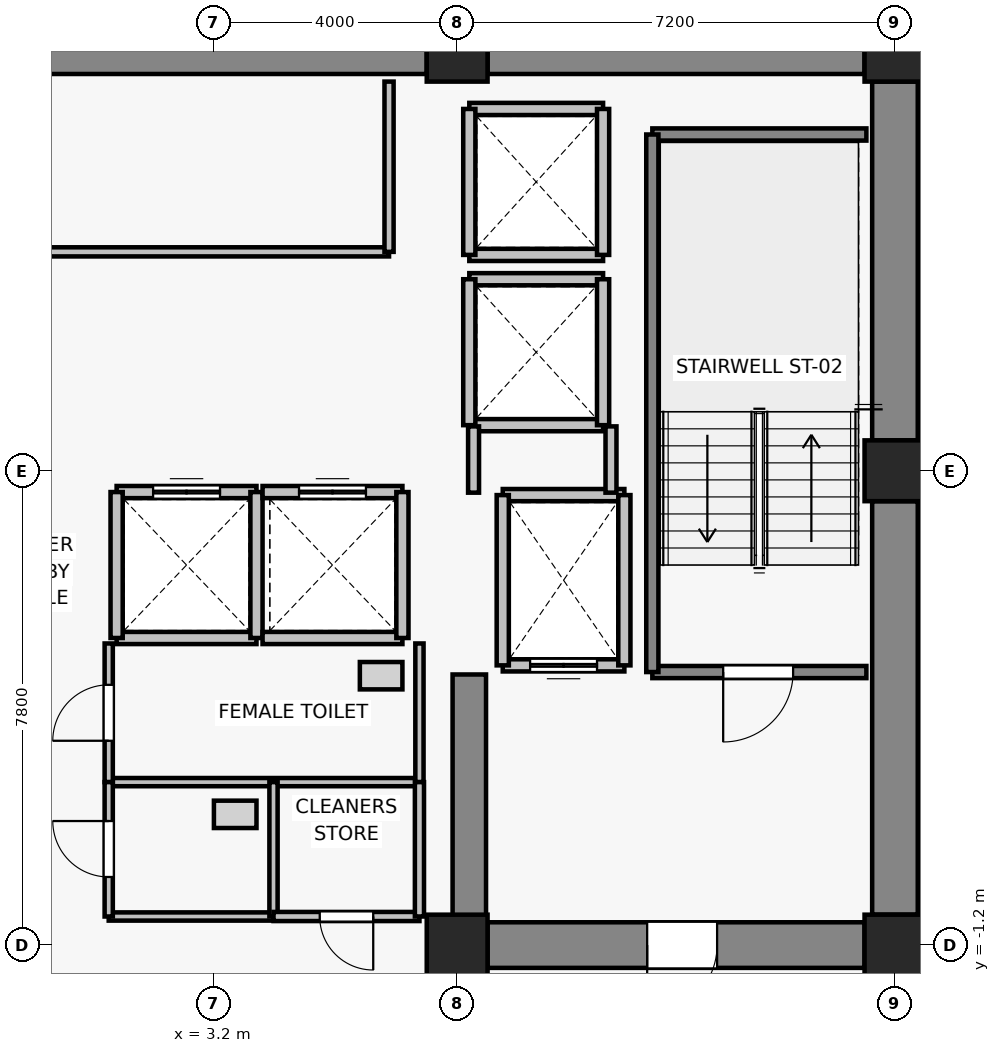
"""IFC4 building model, lengths in metres.
Left out: names, types, materials, properties, quantities, classifications, styles, units other than length and angle.
Written with IfcOpenShell. Run it as: python <this file> out.ifc"""

import sys

from ifc_helpers import new_model, si_unit, direction, frame, frame_2d, origin, origin_2d, place, context, subcontext, project, spatial, rectangle, extrude, source, transform, mapped, element, fill, save


model = new_model("IFC4")
c1 = context("Model", 3, precision=1e-05, world=origin(), true_north=direction((0.0, 1.0)))
c2 = subcontext(c1, "Body", "Model", "MODEL_VIEW")
j1 = project(units=[si_unit("LENGTHUNIT", "METRE"), si_unit("PLANEANGLEUNIT", "RADIAN")], contexts=[c1])
p1 = place(None, origin())
s1 = spatial("IfcSite", under=j1, at=p1, CompositionType="ELEMENT")
p2 = place(p1, origin())
s2 = spatial("IfcBuilding", under=s1, at=p2, CompositionType="ELEMENT")
p3 = place(p2, frame((0.0, 0.0, 189.1)))
s3 = spatial("IfcBuildingStorey", under=s2, at=p3, CompositionType="ELEMENT", Elevation=189.1)
for number, where, z_axis, x_axis in (
    (1, (7.2, -1.2, 0.0), (0.0, 0.0, 1.0), (1.0, 0.0, 0.0)),
    (2, (14.4, -1.2, 0.0), (0.0, 0.0, 1.0), (1.0, 0.0, 0.0)),
    (3, (14.4, 6.6, 0.0), (0.0, 0.0, 1.0), (1.0, 0.0, 0.0)),
    (4, (7.2, 13.5, 0.0), (0.0, 0.0, 1.0), (1.0, 0.0, 0.0)),
    (5, (14.4, 13.5, 0.0), (0.0, 0.0, 1.0), (1.0, 0.0, 0.0)),
):
    element("IfcColumn", number, at=place(p3, frame(where, z_axis=z_axis, x_axis=x_axis)), inside=s3, PredefinedType="COLUMN", context=c2, shape_type="SweptSolid", body=[
        extrude(rectangle(XDim=1.0, YDim=1.0, at=origin_2d()), origin(), (0.0, 0.0, 1.0), 3.3),
    ])
p4 = place(p3, frame((-6.7, 13.5, 0.0), z_axis=(0.0, 0.0, 1.0), x_axis=(1.0, 0.0, 0.0)))
e6 = element("IfcWall", 6, at=p4, inside=s3, PredefinedType="SHEAR", context=c2, shape_type="SweptSolid", body=[
    extrude(rectangle(XDim=13.4, YDim=0.75, at=frame_2d((6.7, 0.0))), origin(), (0.0, 0.0, 1.0), 3.075),
])
p5 = place(p3, frame((7.7, 13.5, 0.0), z_axis=(0.0, 0.0, 1.0), x_axis=(1.0, 0.0, 0.0)))
e7 = element("IfcWall", 7, at=p5, inside=s3, PredefinedType="SHEAR", context=c2, shape_type="SweptSolid", body=[
    extrude(rectangle(XDim=6.2, YDim=0.75, at=frame_2d((3.1, 0.0))), origin(), (0.0, 0.0, 1.0), 3.075),
])
p6 = place(p3, frame((14.4, -0.7, 0.0), z_axis=(0.0, 0.0, 1.0), x_axis=(0.0, 1.0, 0.0)))
e8 = element("IfcWall", 8, at=p6, inside=s3, PredefinedType="SHEAR", context=c2, shape_type="SweptSolid", body=[
    extrude(rectangle(XDim=6.8, YDim=0.75, at=frame_2d((3.4, 0.0))), origin(), (0.0, 0.0, 1.0), 3.075),
])
p7 = place(p3, frame((14.4, 7.1, 0.0), z_axis=(0.0, 0.0, 1.0), x_axis=(0.0, 1.0, 0.0)))
e9 = element("IfcWall", 9, at=p7, inside=s3, PredefinedType="SHEAR", context=c2, shape_type="SweptSolid", body=[
    extrude(rectangle(XDim=5.9, YDim=0.75, at=frame_2d((2.95, 0.0))), origin(), (0.0, 0.0, 1.0), 3.075),
])
p8 = place(p3, frame((13.9, -1.2, 0.0), z_axis=(0.0, 0.0, 1.0), x_axis=(-1.0, 0.0, 0.0)))
e10 = element("IfcWall", 10, at=p8, inside=s3, PredefinedType="SHEAR", context=c2, shape_type="SweptSolid", body=[
    extrude(rectangle(XDim=6.2, YDim=0.75, at=frame_2d((3.1, 0.0))), origin(), (0.0, 0.0, 1.0), 3.075),
])
p9 = place(p8, frame((2.425, 0.0, 0.0)))
e11 = element("IfcOpeningElement", 11, at=p9, cuts=e10, PredefinedType="OPENING", context=c2, shape_type="SweptSolid", body=[
    extrude(rectangle(XDim=1.15, YDim=2.15, at=frame_2d((0.575, 1.075))), frame((0.0, 0.385, 0.0), z_axis=(0.0, -1.0, 0.0), x_axis=(1.0, 0.0, 0.0)), (0.0, 0.0, 1.0), 0.77),
])
p10 = place(p3, frame((7.4, -0.825, 0.0), z_axis=(0.0, 0.0, 1.0), x_axis=(0.0, 1.0, 0.0)))
e12 = element("IfcWall", 12, at=p10, inside=s3, PredefinedType="SHEAR", context=c2, shape_type="SweptSolid", body=[
    extrude(rectangle(XDim=4.075, YDim=0.55, at=frame_2d((2.038, 0.0))), origin(), (0.0, 0.0, 1.0), 3.075),
])
p11 = place(p3, frame((9.95, 3.4, 0.0), z_axis=(0.0, 0.0, 1.0), x_axis=(-1.0, 0.0, 0.0)))
e13 = element("IfcWall", 13, at=p11, inside=s3, PredefinedType="SOLIDWALL", context=c2, shape_type="SweptSolid", body=[
    extrude(rectangle(XDim=2.0, YDim=0.2, at=frame_2d((1.0, 0.0))), origin(), (0.0, 0.0, 1.0), 3.075),
])
p12 = place(p11, frame((0.45, 0.0, 0.0)))
e14 = element("IfcOpeningElement", 14, at=p12, cuts=e13, PredefinedType="OPENING", context=c2, shape_type="SweptSolid", body=[
    extrude(rectangle(XDim=1.1, YDim=2.2, at=frame_2d((0.55, 1.1))), frame((0.0, 0.11, 0.0), z_axis=(0.0, -1.0, 0.0), x_axis=(1.0, 0.0, 0.0)), (0.0, 0.0, 1.0), 0.22),
])
p13 = place(p3, frame((7.95, 6.2, 0.0), z_axis=(0.0, 0.0, 1.0), x_axis=(1.0, 0.0, 0.0)))
e15 = element("IfcWall", 15, at=p13, inside=s3, PredefinedType="SOLIDWALL", context=c2, shape_type="SweptSolid", body=[
    extrude(rectangle(XDim=2.0, YDim=0.2, at=frame_2d((1.0, 0.0))), origin(), (0.0, 0.0, 1.0), 3.075),
])
for number, where, z_axis, x_axis in (
    (16, (7.95, 3.4, 0.0), (0.0, 0.0, 1.0), (0.0, 1.0, 0.0)),
    (17, (9.95, 6.2, 0.0), (0.0, 0.0, 1.0), (0.0, -1.0, 0.0)),
):
    element("IfcWall", number, at=place(p3, frame(where, z_axis=z_axis, x_axis=x_axis)), inside=s3, PredefinedType="SOLIDWALL", context=c2, shape_type="SweptSolid", body=[
        extrude(rectangle(XDim=2.8, YDim=0.2, at=frame_2d((1.4, 0.0))), origin(), (0.0, 0.0, 1.0), 3.075),
    ])
p14 = place(p3, frame((3.9, 3.85, 0.0), z_axis=(0.0, 0.0, 1.0), x_axis=(-1.0, 0.0, 0.0)))
e18 = element("IfcWall", 18, at=p14, inside=s3, PredefinedType="SOLIDWALL", context=c2, shape_type="SweptSolid", body=[
    extrude(rectangle(XDim=2.3, YDim=0.2, at=frame_2d((1.15, 0.0))), origin(), (0.0, 0.0, 1.0), 3.075),
])
p15 = place(p3, frame((1.6, 6.25, 0.0), z_axis=(0.0, 0.0, 1.0), x_axis=(1.0, 0.0, 0.0)))
e19 = element("IfcWall", 19, at=p15, inside=s3, PredefinedType="SOLIDWALL", context=c2, shape_type="SweptSolid", body=[
    extrude(rectangle(XDim=2.3, YDim=0.2, at=frame_2d((1.15, 0.0))), origin(), (0.0, 0.0, 1.0), 3.075),
])
p16 = place(p15, frame((0.6, 0.0, 0.0)))
e20 = element("IfcOpeningElement", 20, at=p16, cuts=e19, PredefinedType="OPENING", context=c2, shape_type="SweptSolid", body=[
    extrude(rectangle(XDim=1.1, YDim=2.2, at=frame_2d((0.55, 1.1))), frame((0.0, 0.11, 0.0), z_axis=(0.0, -1.0, 0.0), x_axis=(1.0, 0.0, 0.0)), (0.0, 0.0, 1.0), 0.22),
])
for number, where, z_axis, x_axis in (
    (21, (1.6, 3.85, 0.0), (0.0, 0.0, 1.0), (0.0, 1.0, 0.0)),
    (22, (3.9, 6.25, 0.0), (0.0, 0.0, 1.0), (0.0, -1.0, 0.0)),
):
    element("IfcWall", number, at=place(p3, frame(where, z_axis=z_axis, x_axis=x_axis)), inside=s3, PredefinedType="SOLIDWALL", context=c2, shape_type="SweptSolid", body=[
        extrude(rectangle(XDim=2.4, YDim=0.2, at=frame_2d((1.2, 0.0))), origin(), (0.0, 0.0, 1.0), 3.075),
    ])
p17 = place(p3, frame((6.3, 3.85, 0.0), z_axis=(0.0, 0.0, 1.0), x_axis=(-1.0, 0.0, 0.0)))
e23 = element("IfcWall", 23, at=p17, inside=s3, PredefinedType="SOLIDWALL", context=c2, shape_type="SweptSolid", body=[
    extrude(rectangle(XDim=2.3, YDim=0.2, at=frame_2d((1.15, 0.0))), origin(), (0.0, 0.0, 1.0), 3.075),
])
p18 = place(p3, frame((4.0, 6.25, 0.0), z_axis=(0.0, 0.0, 1.0), x_axis=(1.0, 0.0, 0.0)))
e24 = element("IfcWall", 24, at=p18, inside=s3, PredefinedType="SOLIDWALL", context=c2, shape_type="SweptSolid", body=[
    extrude(rectangle(XDim=2.3, YDim=0.2, at=frame_2d((1.15, 0.0))), origin(), (0.0, 0.0, 1.0), 3.075),
])
p19 = place(p18, frame((0.6, 0.0, 0.0)))
e25 = element("IfcOpeningElement", 25, at=p19, cuts=e24, PredefinedType="OPENING", context=c2, shape_type="SweptSolid", body=[
    extrude(rectangle(XDim=1.1, YDim=2.2, at=frame_2d((0.55, 1.1))), frame((0.0, 0.11, 0.0), z_axis=(0.0, -1.0, 0.0), x_axis=(1.0, 0.0, 0.0)), (0.0, 0.0, 1.0), 0.22),
])
p20 = place(p3, frame((6.3, 6.25, 0.0), z_axis=(0.0, 0.0, 1.0), x_axis=(0.0, -1.0, 0.0)))
e26 = element("IfcWall", 26, at=p20, inside=s3, PredefinedType="SOLIDWALL", context=c2, shape_type="SweptSolid", body=[
    extrude(rectangle(XDim=2.4, YDim=0.2, at=frame_2d((1.2, 0.0))), origin(), (0.0, 0.0, 1.0), 3.075),
])
for number, where, z_axis, x_axis in (
    (27, (9.6, 7.35, 0.0), (0.0, 0.0, 1.0), (-1.0, 0.0, 0.0)),
    (28, (7.4, 9.75, 0.0), (0.0, 0.0, 1.0), (1.0, 0.0, 0.0)),
):
    element("IfcWall", number, at=place(p3, frame(where, z_axis=z_axis, x_axis=x_axis)), inside=s3, PredefinedType="SOLIDWALL", context=c2, shape_type="SweptSolid", body=[
        extrude(rectangle(XDim=2.2, YDim=0.2, at=frame_2d((1.1, 0.0))), origin(), (0.0, 0.0, 1.0), 2.565),
    ])
p21 = place(p3, frame((7.4, 7.35, 0.0), z_axis=(0.0, 0.0, 1.0), x_axis=(0.0, 1.0, 0.0)))
e29 = element("IfcWall", 29, at=p21, inside=s3, PredefinedType="SOLIDWALL", context=c2, shape_type="SweptSolid", body=[
    extrude(rectangle(XDim=2.4, YDim=0.2, at=frame_2d((1.2, 0.0))), origin(), (0.0, 0.0, 1.0), 2.565),
])
p22 = place(p3, frame((9.6, 9.75, 0.0), z_axis=(0.0, 0.0, 1.0), x_axis=(0.0, -1.0, 0.0)))
e30 = element("IfcWall", 30, at=p22, inside=s3, PredefinedType="SOLIDWALL", context=c2, shape_type="SweptSolid", body=[
    extrude(rectangle(XDim=2.4, YDim=0.2, at=frame_2d((1.2, 0.0))), origin(), (0.0, 0.0, 1.0), 3.075),
])
for number, where, z_axis, x_axis in (
    (31, (9.6, 10.15, 0.0), (0.0, 0.0, 1.0), (-1.0, 0.0, 0.0)),
    (32, (7.4, 12.55, 0.0), (0.0, 0.0, 1.0), (1.0, 0.0, 0.0)),
):
    element("IfcWall", number, at=place(p3, frame(where, z_axis=z_axis, x_axis=x_axis)), inside=s3, PredefinedType="SOLIDWALL", context=c2, shape_type="SweptSolid", body=[
        extrude(rectangle(XDim=2.2, YDim=0.2, at=frame_2d((1.1, 0.0))), origin(), (0.0, 0.0, 1.0), 2.565),
    ])
p23 = place(p3, frame((7.4, 10.15, 0.0), z_axis=(0.0, 0.0, 1.0), x_axis=(0.0, 1.0, 0.0)))
e33 = element("IfcWall", 33, at=p23, inside=s3, PredefinedType="SOLIDWALL", context=c2, shape_type="SweptSolid", body=[
    extrude(rectangle(XDim=2.4, YDim=0.2, at=frame_2d((1.2, 0.0))), origin(), (0.0, 0.0, 1.0), 2.565),
])
p24 = place(p3, frame((9.6, 12.55, 0.0), z_axis=(0.0, 0.0, 1.0), x_axis=(0.0, -1.0, 0.0)))
e34 = element("IfcWall", 34, at=p24, inside=s3, PredefinedType="SOLIDWALL", context=c2, shape_type="SweptSolid", body=[
    extrude(rectangle(XDim=2.4, YDim=0.2, at=frame_2d((1.2, 0.0))), origin(), (0.0, 0.0, 1.0), 3.075),
])
p25 = place(p3, frame((13.93, 3.29, 0.0), z_axis=(0.0, 0.0, 1.0), x_axis=(-1.0, 0.0, 0.0)))
e35 = element("IfcWall", 35, at=p25, inside=s3, PredefinedType="SOLIDWALL", context=c2, shape_type="SweptSolid", body=[
    extrude(rectangle(XDim=3.52, YDim=0.2, at=frame_2d((1.76, 0.0))), origin(), (0.0, 0.0, 1.0), 3.075),
])
p26 = place(p25, frame((1.205, 0.0, 0.0)))
e36 = element("IfcOpeningElement", 36, at=p26, cuts=e35, PredefinedType="OPENING", context=c2, shape_type="SweptSolid", body=[
    extrude(rectangle(XDim=1.15, YDim=2.15, at=frame_2d((0.575, 1.075))), frame((0.0, 0.11, 0.0), z_axis=(0.0, -1.0, 0.0), x_axis=(1.0, 0.0, 0.0)), (0.0, 0.0, 1.0), 0.22),
])
p27 = place(p3, frame((10.41, 12.13, 0.0), z_axis=(0.0, 0.0, 1.0), x_axis=(1.0, 0.0, 0.0)))
e37 = element("IfcWall", 37, at=p27, inside=s3, PredefinedType="SOLIDWALL", context=c2, shape_type="SweptSolid", body=[
    extrude(rectangle(XDim=3.52, YDim=0.2, at=frame_2d((1.76, 0.0))), origin(), (0.0, 0.0, 1.0), 3.075),
])
p28 = place(p3, frame((10.41, 3.29, 0.0), z_axis=(0.0, 0.0, 1.0), x_axis=(0.0, 1.0, 0.0)))
e38 = element("IfcWall", 38, at=p28, inside=s3, PredefinedType="SOLIDWALL", context=c2, shape_type="SweptSolid", body=[
    extrude(rectangle(XDim=8.84, YDim=0.2, at=frame_2d((4.42, 0.0))), origin(), (0.0, 0.0, 1.0), 3.075),
])
p29 = place(p3, frame((7.47, 6.24, 0.0), z_axis=(0.0, 0.0, 1.0), x_axis=(0.0, 1.0, 0.0)))
e39 = element("IfcWall", 39, at=p29, inside=s3, PredefinedType="PARTITIONING", context=c2, shape_type="SweptSolid", body=[
    extrude(rectangle(XDim=1.09, YDim=0.18, at=frame_2d((0.545, 0.0))), origin(), (0.0, 0.0, 1.0), 2.565),
])
p30 = place(p3, frame((9.73, 7.33, 0.0), z_axis=(0.0, 0.0, 1.0), x_axis=(0.0, -1.0, 0.0)))
e40 = element("IfcWall", 40, at=p30, inside=s3, PredefinedType="PARTITIONING", context=c2, shape_type="SweptSolid", body=[
    extrude(rectangle(XDim=1.09, YDim=0.18, at=frame_2d((0.545, 0.0))), origin(), (0.0, 0.0, 1.0), 3.075),
])
p31 = place(p3, frame((6.08, 10.2, 0.0), z_axis=(0.0, 0.0, 1.0), x_axis=(-1.0, 0.0, 0.0)))
e41 = element("IfcWall", 41, at=p31, inside=s3, PredefinedType="PARTITIONING", context=c2, shape_type="SweptSolid", body=[
    extrude(rectangle(XDim=12.16, YDim=0.15, at=frame_2d((6.08, 0.0))), origin(), (0.0, 0.0, 1.0), 3.075),
])
p32 = place(p31, frame((7.005, 0.0, 0.0)))
e42 = element("IfcOpeningElement", 42, at=p32, cuts=e41, PredefinedType="OPENING", context=c2, shape_type="SweptSolid", body=[
    extrude(rectangle(XDim=1.15, YDim=2.15, at=frame_2d((0.575, 1.075))), frame((0.0, 0.085, 0.0), z_axis=(0.0, -1.0, 0.0), x_axis=(1.0, 0.0, 0.0)), (0.0, 0.0, 1.0), 0.17),
])
p33 = place(p3, frame((6.08, 13.0, 0.0), z_axis=(0.0, 0.0, 1.0), x_axis=(0.0, -1.0, 0.0)))
e43 = element("IfcWall", 43, at=p33, inside=s3, PredefinedType="PARTITIONING", context=c2, shape_type="SweptSolid", body=[
    extrude(rectangle(XDim=2.8, YDim=0.15, at=frame_2d((1.4, 0.0))), origin(), (0.0, 0.0, 1.0), 3.075),
])
p34 = place(p3, frame((6.58, 1.48, 0.0), z_axis=(0.0, 0.0, 1.0), x_axis=(-1.0, 0.0, 0.0)))
e44 = element("IfcWall", 44, at=p34, inside=s3, PredefinedType="PARTITIONING", context=c2, shape_type="SweptSolid", body=[
    extrude(rectangle(XDim=5.11, YDim=0.135, at=frame_2d((2.555, 0.0))), origin(), (0.0, 0.0, 1.0), 3.075),
])
p35 = place(p3, frame((1.47, 1.48, 0.0), z_axis=(0.0, 0.0, 1.0), x_axis=(0.0, 1.0, 0.0)))
e45 = element("IfcWall", 45, at=p35, inside=s3, PredefinedType="PARTITIONING", context=c2, shape_type="SweptSolid", body=[
    extrude(rectangle(XDim=2.28, YDim=0.135, at=frame_2d((1.14, 0.0))), origin(), (0.0, 0.0, 1.0), 3.075),
])
p36 = place(p35, frame((0.68, 0.0, 0.0)))
e46 = element("IfcOpeningElement", 46, at=p36, cuts=e45, PredefinedType="OPENING", context=c2, shape_type="SweptSolid", body=[
    extrude(rectangle(XDim=0.92, YDim=2.1, at=frame_2d((0.46, 1.05))), frame((0.0, 0.077, 0.0), z_axis=(0.0, -1.0, 0.0), x_axis=(1.0, 0.0, 0.0)), (0.0, 0.0, 1.0), 0.155),
])
p37 = place(p3, frame((6.58, 3.76, 0.0), z_axis=(0.0, 0.0, 1.0), x_axis=(0.0, -1.0, 0.0)))
e47 = element("IfcWall", 47, at=p37, inside=s3, PredefinedType="PARTITIONING", context=c2, shape_type="SweptSolid", body=[
    extrude(rectangle(XDim=2.28, YDim=0.135, at=frame_2d((1.14, 0.0))), origin(), (0.0, 0.0, 1.0), 3.075),
])
p38 = place(p3, frame((4.18, -0.73, 0.0), z_axis=(0.0, 0.0, 1.0), x_axis=(-1.0, 0.0, 0.0)))
e48 = element("IfcWall", 48, at=p38, inside=s3, PredefinedType="PARTITIONING", context=c2, shape_type="SweptSolid", body=[
    extrude(rectangle(XDim=2.71, YDim=0.135, at=frame_2d((1.355, 0.0))), origin(), (0.0, 0.0, 1.0), 3.075),
])
p39 = place(p3, frame((1.47, -0.73, 0.0), z_axis=(0.0, 0.0, 1.0), x_axis=(0.0, 1.0, 0.0)))
e49 = element("IfcWall", 49, at=p39, inside=s3, PredefinedType="PARTITIONING", context=c2, shape_type="SweptSolid", body=[
    extrude(rectangle(XDim=2.21, YDim=0.135, at=frame_2d((1.105, 0.0))), origin(), (0.0, 0.0, 1.0), 3.075),
])
p40 = place(p39, frame((0.65, 0.0, 0.0)))
e50 = element("IfcOpeningElement", 50, at=p40, cuts=e49, PredefinedType="OPENING", context=c2, shape_type="SweptSolid", body=[
    extrude(rectangle(XDim=0.92, YDim=2.1, at=frame_2d((0.46, 1.05))), frame((0.0, 0.077, 0.0), z_axis=(0.0, -1.0, 0.0), x_axis=(1.0, 0.0, 0.0)), (0.0, 0.0, 1.0), 0.155),
])
p41 = place(p3, frame((4.18, 1.48, 0.0), z_axis=(0.0, 0.0, 1.0), x_axis=(0.0, -1.0, 0.0)))
e51 = element("IfcWall", 51, at=p41, inside=s3, PredefinedType="PARTITIONING", context=c2, shape_type="SweptSolid", body=[
    extrude(rectangle(XDim=2.21, YDim=0.135, at=frame_2d((1.105, 0.0))), origin(), (0.0, 0.0, 1.0), 3.075),
])
p42 = place(p3, frame((6.58, -0.73, 0.0), z_axis=(0.0, 0.0, 1.0), x_axis=(-1.0, 0.0, 0.0)))
e52 = element("IfcWall", 52, at=p42, inside=s3, PredefinedType="PARTITIONING", context=c2, shape_type="SweptSolid", body=[
    extrude(rectangle(XDim=2.4, YDim=0.15, at=frame_2d((1.2, 0.0))), origin(), (0.0, 0.0, 1.0), 3.075),
])
p43 = place(p42, frame((0.76, 0.0, 0.0)))
e53 = element("IfcOpeningElement", 53, at=p43, cuts=e52, PredefinedType="OPENING", context=c2, shape_type="SweptSolid", body=[
    extrude(rectangle(XDim=0.88, YDim=2.1, at=frame_2d((0.44, 1.05))), frame((0.0, 0.085, 0.0), z_axis=(0.0, -1.0, 0.0), x_axis=(1.0, 0.0, 0.0)), (0.0, 0.0, 1.0), 0.17),
])
p44 = place(p3, frame((6.58, 1.48, 0.0), z_axis=(0.0, 0.0, 1.0), x_axis=(0.0, -1.0, 0.0)))
e54 = element("IfcWall", 54, at=p44, inside=s3, PredefinedType="PARTITIONING", context=c2, shape_type="SweptSolid", body=[
    extrude(rectangle(XDim=2.21, YDim=0.15, at=frame_2d((1.105, 0.0))), origin(), (0.0, 0.0, 1.0), 3.075),
])
m1 = source(origin(), c2, "Body", "SweptSolid", [
    extrude(rectangle(XDim=1.1, YDim=2.2, at=frame_2d((0.55, 1.1))), frame((0.0, 0.025, 0.0), z_axis=(0.0, -1.0, 0.0), x_axis=(1.0, 0.0, 0.0)), (0.0, 0.0, 1.0), 0.05),
])
p45 = place(p12, origin())
e55 = element("IfcDoor", 55, at=p45, inside=s3, OperationType="DOUBLE_DOOR_SLIDING", PredefinedType="DOOR", context=c2, shape_type="MappedRepresentation", body=[
    mapped(m1, transform((0.0, 0.0, 0.0), x_axis=(1.0, 0.0, 0.0), y_axis=(0.0, 1.0, 0.0), z_axis=(0.0, 0.0, 1.0), scale=1.0)),
])
fill(e14, e55)
p46 = place(p16, origin())
e56 = element("IfcDoor", 56, at=p46, inside=s3, OperationType="DOUBLE_DOOR_SLIDING", PredefinedType="DOOR", context=c2, shape_type="MappedRepresentation", body=[
    mapped(m1, transform((0.0, 0.0, 0.0), x_axis=(1.0, 0.0, 0.0), y_axis=(0.0, 1.0, 0.0), z_axis=(0.0, 0.0, 1.0), scale=1.0)),
])
fill(e20, e56)
p47 = place(p19, origin())
e57 = element("IfcDoor", 57, at=p47, inside=s3, OperationType="DOUBLE_DOOR_SLIDING", PredefinedType="DOOR", context=c2, shape_type="MappedRepresentation", body=[
    mapped(m1, transform((0.0, 0.0, 0.0), x_axis=(1.0, 0.0, 0.0), y_axis=(0.0, 1.0, 0.0), z_axis=(0.0, 0.0, 1.0), scale=1.0)),
])
fill(e25, e57)
m2 = source(origin(), c2, "Body", "SweptSolid", [
    extrude(rectangle(XDim=1.15, YDim=2.15, at=frame_2d((0.575, 1.075))), frame((0.0, 0.025, 0.0), z_axis=(0.0, -1.0, 0.0), x_axis=(1.0, 0.0, 0.0)), (0.0, 0.0, 1.0), 0.05),
])
p48 = place(p26, origin())
e58 = element("IfcDoor", 58, at=p48, inside=s3, OperationType="SINGLE_SWING_RIGHT", PredefinedType="DOOR", context=c2, shape_type="MappedRepresentation", body=[
    mapped(m2, transform((0.0, 0.0, 0.0), x_axis=(1.0, 0.0, 0.0), y_axis=(0.0, 1.0, 0.0), z_axis=(0.0, 0.0, 1.0), scale=1.0)),
])
fill(e36, e58)
p49 = place(p9, origin())
e59 = element("IfcDoor", 59, at=p49, inside=s3, OperationType="SINGLE_SWING_RIGHT", PredefinedType="DOOR", context=c2, shape_type="MappedRepresentation", body=[
    mapped(m2, transform((0.0, 0.0, 0.0), x_axis=(1.0, 0.0, 0.0), y_axis=(0.0, 1.0, 0.0), z_axis=(0.0, 0.0, 1.0), scale=1.0)),
])
fill(e11, e59)
m3 = source(origin(), c2, "Body", "SweptSolid", [
    extrude(rectangle(XDim=0.92, YDim=2.1, at=frame_2d((0.46, 1.05))), frame((0.0, 0.025, 0.0), z_axis=(0.0, -1.0, 0.0), x_axis=(1.0, 0.0, 0.0)), (0.0, 0.0, 1.0), 0.05),
])
p50 = place(p36, origin())
e60 = element("IfcDoor", 60, at=p50, inside=s3, OperationType="SINGLE_SWING_LEFT", PredefinedType="DOOR", context=c2, shape_type="MappedRepresentation", body=[
    mapped(m3, transform((0.0, 0.0, 0.0), x_axis=(1.0, 0.0, 0.0), y_axis=(0.0, 1.0, 0.0), z_axis=(0.0, 0.0, 1.0), scale=1.0)),
])
fill(e46, e60)
p51 = place(p40, origin())
e61 = element("IfcDoor", 61, at=p51, inside=s3, OperationType="SINGLE_SWING_RIGHT", PredefinedType="DOOR", context=c2, shape_type="MappedRepresentation", body=[
    mapped(m3, transform((0.0, 0.0, 0.0), x_axis=(1.0, 0.0, 0.0), y_axis=(0.0, 1.0, 0.0), z_axis=(0.0, 0.0, 1.0), scale=1.0)),
])
fill(e50, e61)
m4 = source(origin(), c2, "Body", "SweptSolid", [
    extrude(rectangle(XDim=0.88, YDim=2.1, at=frame_2d((0.44, 1.05))), frame((0.0, 0.025, 0.0), z_axis=(0.0, -1.0, 0.0), x_axis=(1.0, 0.0, 0.0)), (0.0, 0.0, 1.0), 0.05),
])
p52 = place(p43, origin())
e62 = element("IfcDoor", 62, at=p52, inside=s3, OperationType="SINGLE_SWING_LEFT", PredefinedType="DOOR", context=c2, shape_type="MappedRepresentation", body=[
    mapped(m4, transform((0.0, 0.0, 0.0), x_axis=(1.0, 0.0, 0.0), y_axis=(0.0, 1.0, 0.0), z_axis=(0.0, 0.0, 1.0), scale=1.0)),
])
fill(e53, e62)
save(model, sys.argv[1])
